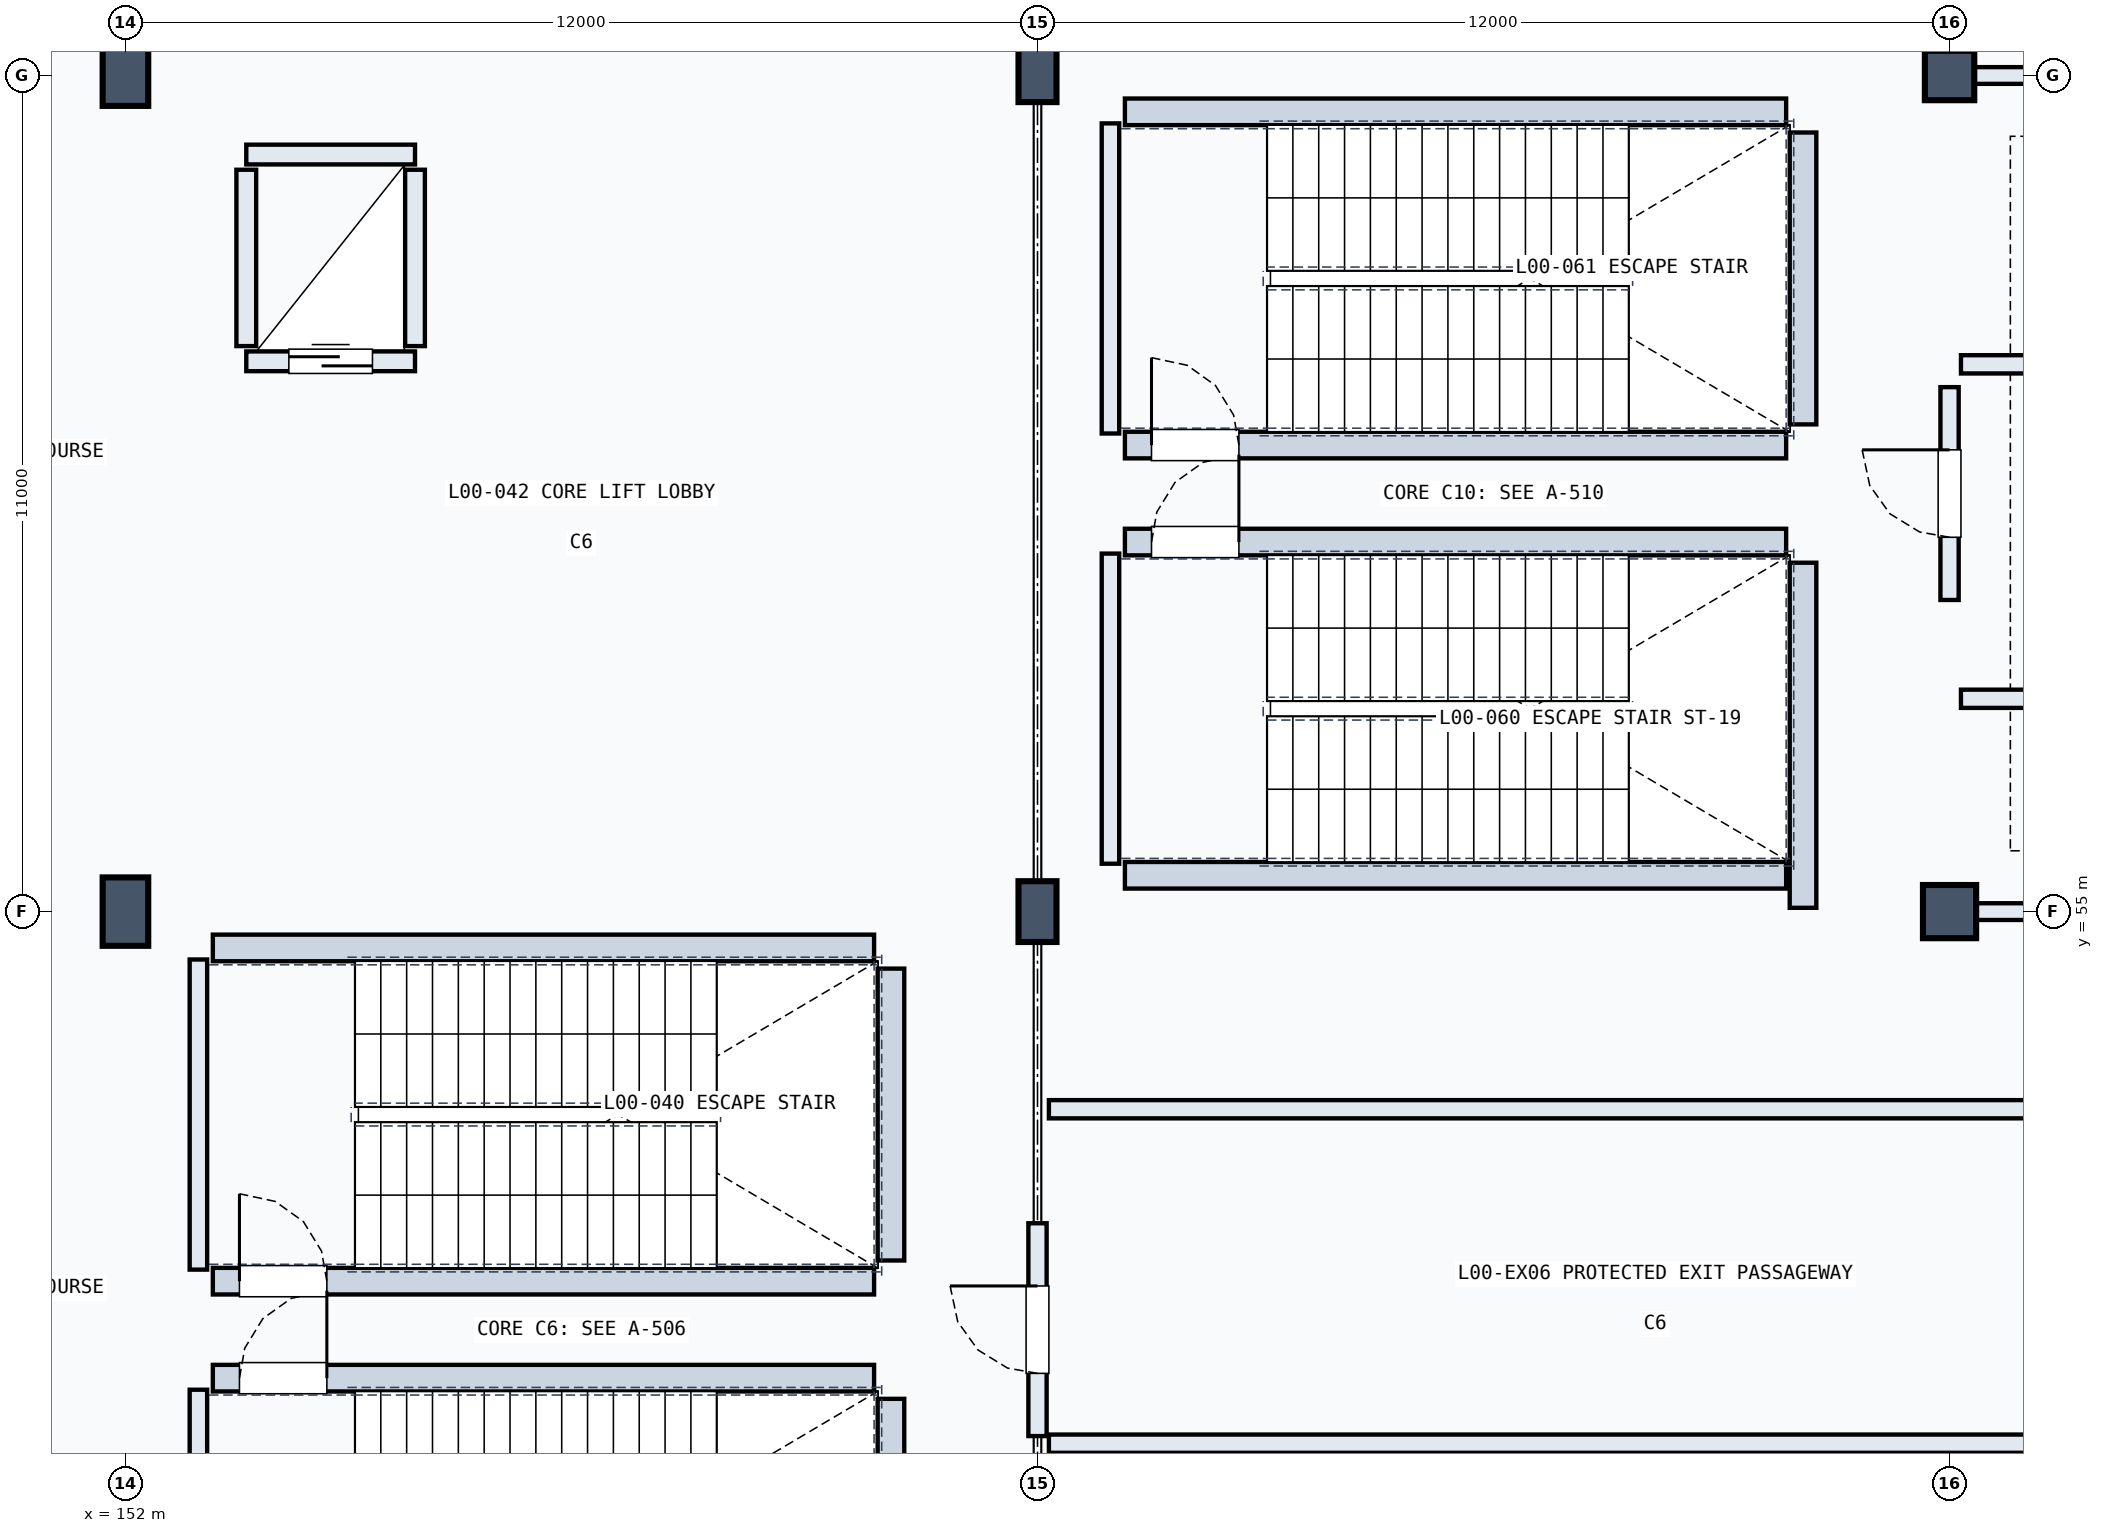
"""IFC4 building model, lengths in metres.
Left out: names, types, materials, properties, quantities, classifications, styles, units other than length and angle.
Written with IfcOpenShell. Run it as: python <this file> out.ifc"""

import sys

from ifc_helpers import new_model, si_unit, direction, frame, frame_2d, origin, origin_2d, place, context, subcontext, project, spatial, rectangle, extrude, element, fill, save


model = new_model("IFC4")
c1 = context("Model", 3, precision=1e-05, world=origin(), true_north=direction((0.0, 1.0)))
c2 = subcontext(c1, "Body", "Model", "MODEL_VIEW")
j1 = project(units=[si_unit("LENGTHUNIT", "METRE"), si_unit("PLANEANGLEUNIT", "RADIAN")], contexts=[c1])
p1 = place(None, origin())
s1 = spatial("IfcSite", under=j1, at=p1, CompositionType="ELEMENT")
p2 = place(p1, origin())
s2 = spatial("IfcBuilding", under=s1, at=p2, CompositionType="ELEMENT")
p3 = place(p2, origin())
s3 = spatial("IfcBuildingStorey", under=s2, at=p3, CompositionType="ELEMENT", Elevation=0.0)
p4 = place(p3, frame((152.0, 55.0, 0.0), z_axis=(0.0, 0.0, 1.0), x_axis=(1.0, 0.0, 0.0)))
e1 = element("IfcColumn", 1, at=p4, inside=s3, PredefinedType="COLUMN", context=c2, shape_type="SweptSolid", body=[
    extrude(rectangle(XDim=0.6, YDim=0.9, at=origin_2d()), origin(), (0.0, 0.0, 1.0), 5.4),
])
p5 = place(p3, frame((152.0, 66.0, 0.0), z_axis=(0.0, 0.0, 1.0), x_axis=(1.0, 0.0, 0.0)))
e2 = element("IfcColumn", 2, at=p5, inside=s3, PredefinedType="COLUMN", context=c2, shape_type="SweptSolid", body=[
    extrude(rectangle(XDim=0.6, YDim=0.8, at=origin_2d()), origin(), (0.0, 0.0, 1.0), 5.4),
])
p6 = place(p3, frame((164.0, 55.0, 0.0), z_axis=(0.0, 0.0, 1.0), x_axis=(1.0, 0.0, 0.0)))
e3 = element("IfcColumn", 3, at=p6, inside=s3, PredefinedType="COLUMN", context=c2, shape_type="SweptSolid", body=[
    extrude(rectangle(XDim=0.5, YDim=0.8, at=origin_2d()), origin(), (0.0, 0.0, 1.0), 5.4),
])
p7 = place(p3, frame((164.0, 66.0, 0.0), z_axis=(0.0, 0.0, 1.0), x_axis=(1.0, 0.0, 0.0)))
e4 = element("IfcColumn", 4, at=p7, inside=s3, PredefinedType="COLUMN", context=c2, shape_type="SweptSolid", body=[
    extrude(rectangle(XDim=0.5, YDim=0.7, at=origin_2d()), origin(), (0.0, 0.0, 1.0), 5.4),
])
p8 = place(p3, frame((176.0, 55.0, 0.0), z_axis=(0.0, 0.0, 1.0), x_axis=(1.0, 0.0, 0.0)))
e5 = element("IfcColumn", 5, at=p8, inside=s3, PredefinedType="COLUMN", context=c2, shape_type="SweptSolid", body=[
    extrude(rectangle(XDim=0.7, YDim=0.7, at=origin_2d()), origin(), (0.0, 0.0, 1.0), 5.4),
])
p9 = place(p3, frame((176.0, 66.0, 0.0), z_axis=(0.0, 0.0, 1.0), x_axis=(1.0, 0.0, 0.0)))
e6 = element("IfcColumn", 6, at=p9, inside=s3, PredefinedType="COLUMN", context=c2, shape_type="SweptSolid", body=[
    extrude(rectangle(XDim=0.65, YDim=0.65, at=origin_2d()), origin(), (0.0, 0.0, 1.0), 5.4),
])
p10 = place(p3, frame((152.96, 44.63, 0.0), z_axis=(0.0, 0.0, 1.0), x_axis=(0.0, 1.0, 0.0)))
e7 = element("IfcWall", 7, at=p10, inside=s3, PredefinedType="SOLIDWALL", context=c2, shape_type="SweptSolid", body=[
    extrude(rectangle(XDim=4.08, YDim=0.23, at=frame_2d((2.04, 0.0))), origin(), (0.0, 0.0, 1.0), 5.06),
])
p11 = place(p3, frame((162.072, 44.05, 0.0), z_axis=(0.0, 0.0, 1.0), x_axis=(0.0, 1.0, 0.0)))
e8 = element("IfcWall", 8, at=p11, inside=s3, PredefinedType="SOLIDWALL", context=c2, shape_type="SweptSolid", body=[
    extrude(rectangle(XDim=4.54, YDim=0.35, at=frame_2d((2.27, 0.0))), origin(), (0.0, 0.0, 1.0), 5.06),
])
p12 = place(p3, frame((153.15, 48.862, 0.0), z_axis=(0.0, 0.0, 1.0), x_axis=(1.0, 0.0, 0.0)))
e9 = element("IfcWall", 9, at=p12, inside=s3, PredefinedType="SOLIDWALL", context=c2, shape_type="SweptSolid", body=[
    extrude(rectangle(XDim=8.7, YDim=0.35, at=frame_2d((4.35, 0.0))), origin(), (0.0, 0.0, 1.0), 5.06),
])
p13 = place(p12, frame((0.35, 0.0, 0.0)))
e10 = element("IfcOpeningElement", 10, at=p13, cuts=e9, PredefinedType="OPENING", context=c2, shape_type="SweptSolid", body=[
    extrude(rectangle(XDim=1.15, YDim=2.2, at=frame_2d((0.575, 1.1))), frame((0.0, 0.185, 0.0), z_axis=(0.0, -1.0, 0.0), x_axis=(1.0, 0.0, 0.0)), (0.0, 0.0, 1.0), 0.37),
])
p14 = place(p3, frame((152.96, 50.29, 0.0), z_axis=(0.0, 0.0, 1.0), x_axis=(0.0, 1.0, 0.0)))
e11 = element("IfcWall", 11, at=p14, inside=s3, PredefinedType="SOLIDWALL", context=c2, shape_type="SweptSolid", body=[
    extrude(rectangle(XDim=4.08, YDim=0.23, at=frame_2d((2.04, 0.0))), origin(), (0.0, 0.0, 1.0), 5.06),
])
p15 = place(p3, frame((162.072, 50.41, 0.0), z_axis=(0.0, 0.0, 1.0), x_axis=(0.0, 1.0, 0.0)))
e12 = element("IfcWall", 12, at=p15, inside=s3, PredefinedType="SOLIDWALL", context=c2, shape_type="SweptSolid", body=[
    extrude(rectangle(XDim=3.84, YDim=0.35, at=frame_2d((1.92, 0.0))), origin(), (0.0, 0.0, 1.0), 5.06),
])
p16 = place(p3, frame((153.15, 50.138, 0.0), z_axis=(0.0, 0.0, 1.0), x_axis=(1.0, 0.0, 0.0)))
e13 = element("IfcWall", 13, at=p16, inside=s3, PredefinedType="SOLIDWALL", context=c2, shape_type="SweptSolid", body=[
    extrude(rectangle(XDim=8.7, YDim=0.35, at=frame_2d((4.35, 0.0))), origin(), (0.0, 0.0, 1.0), 5.06),
])
p17 = place(p16, frame((0.35, 0.0, 0.0)))
e14 = element("IfcOpeningElement", 14, at=p17, cuts=e13, PredefinedType="OPENING", context=c2, shape_type="SweptSolid", body=[
    extrude(rectangle(XDim=1.15, YDim=2.2, at=frame_2d((0.575, 1.1))), frame((0.0, 0.185, 0.0), z_axis=(0.0, -1.0, 0.0), x_axis=(1.0, 0.0, 0.0)), (0.0, 0.0, 1.0), 0.37),
])
p18 = place(p3, frame((153.15, 54.522, 0.0), z_axis=(0.0, 0.0, 1.0), x_axis=(1.0, 0.0, 0.0)))
e15 = element("IfcWall", 15, at=p18, inside=s3, PredefinedType="SOLIDWALL", context=c2, shape_type="SweptSolid", body=[
    extrude(rectangle(XDim=8.7, YDim=0.35, at=frame_2d((4.35, 0.0))), origin(), (0.0, 0.0, 1.0), 5.06),
])
p19 = place(p3, frame((153.59, 62.24, 0.0), z_axis=(0.0, 0.0, 1.0), x_axis=(1.0, 0.0, 0.0)))
e16 = element("IfcWall", 16, at=p19, inside=s3, PredefinedType="SOLIDWALL", context=c2, shape_type="SweptSolid", body=[
    extrude(rectangle(XDim=2.22, YDim=0.26, at=frame_2d((1.11, 0.0))), origin(), (0.0, 0.0, 1.0), 5.06),
])
p20 = place(p19, frame((0.56, 0.0, 0.0)))
e17 = element("IfcOpeningElement", 17, at=p20, cuts=e16, PredefinedType="OPENING", context=c2, shape_type="SweptSolid", body=[
    extrude(rectangle(XDim=1.1, YDim=2.15, at=frame_2d((0.55, 1.075))), frame((0.0, 0.14, 0.0), z_axis=(0.0, -1.0, 0.0), x_axis=(1.0, 0.0, 0.0)), (0.0, 0.0, 1.0), 0.28),
])
p21 = place(p3, frame((153.59, 64.96, 0.0), z_axis=(0.0, 0.0, 1.0), x_axis=(1.0, 0.0, 0.0)))
e18 = element("IfcWall", 18, at=p21, inside=s3, PredefinedType="SOLIDWALL", context=c2, shape_type="SweptSolid", body=[
    extrude(rectangle(XDim=2.22, YDim=0.26, at=frame_2d((1.11, 0.0))), origin(), (0.0, 0.0, 1.0), 5.06),
])
for number, where, z_axis, x_axis in (
    (19, (153.59, 62.44, 0.0), (0.0, 0.0, 1.0), (0.0, 1.0, 0.0)),
    (20, (155.81, 62.44, 0.0), (0.0, 0.0, 1.0), (0.0, 1.0, 0.0)),
):
    element("IfcWall", number, at=place(p3, frame(where, z_axis=z_axis, x_axis=x_axis)), inside=s3, PredefinedType="SOLIDWALL", context=c2, shape_type="SweptSolid", body=[
        extrude(rectangle(XDim=2.32, YDim=0.26, at=frame_2d((1.16, 0.0))), origin(), (0.0, 0.0, 1.0), 5.06),
    ])
p22 = place(p3, frame((164.96, 55.63, 0.0), z_axis=(0.0, 0.0, 1.0), x_axis=(0.0, 1.0, 0.0)))
e21 = element("IfcWall", 21, at=p22, inside=s3, PredefinedType="SOLIDWALL", context=c2, shape_type="SweptSolid", body=[
    extrude(rectangle(XDim=4.08, YDim=0.23, at=frame_2d((2.04, 0.0))), origin(), (0.0, 0.0, 1.0), 4.45),
])
p23 = place(p3, frame((174.072, 55.05, 0.0), z_axis=(0.0, 0.0, 1.0), x_axis=(0.0, 1.0, 0.0)))
e22 = element("IfcWall", 22, at=p23, inside=s3, PredefinedType="SOLIDWALL", context=c2, shape_type="SweptSolid", body=[
    extrude(rectangle(XDim=4.54, YDim=0.35, at=frame_2d((2.27, 0.0))), origin(), (0.0, 0.0, 1.0), 5.06),
])
p24 = place(p3, frame((165.15, 55.478, 0.0), z_axis=(0.0, 0.0, 1.0), x_axis=(1.0, 0.0, 0.0)))
e23 = element("IfcWall", 23, at=p24, inside=s3, PredefinedType="SOLIDWALL", context=c2, shape_type="SweptSolid", body=[
    extrude(rectangle(XDim=8.7, YDim=0.35, at=frame_2d((4.35, 0.0))), origin(), (0.0, 0.0, 1.0), 5.06),
])
p25 = place(p3, frame((165.15, 59.862, 0.0), z_axis=(0.0, 0.0, 1.0), x_axis=(1.0, 0.0, 0.0)))
e24 = element("IfcWall", 24, at=p25, inside=s3, PredefinedType="SOLIDWALL", context=c2, shape_type="SweptSolid", body=[
    extrude(rectangle(XDim=8.7, YDim=0.35, at=frame_2d((4.35, 0.0))), origin(), (0.0, 0.0, 1.0), 5.06),
])
p26 = place(p25, frame((0.35, 0.0, 0.0)))
e25 = element("IfcOpeningElement", 25, at=p26, cuts=e24, PredefinedType="OPENING", context=c2, shape_type="SweptSolid", body=[
    extrude(rectangle(XDim=1.15, YDim=2.2, at=frame_2d((0.575, 1.1))), frame((0.0, 0.185, 0.0), z_axis=(0.0, -1.0, 0.0), x_axis=(1.0, 0.0, 0.0)), (0.0, 0.0, 1.0), 0.37),
])
p27 = place(p3, frame((164.96, 61.29, 0.0), z_axis=(0.0, 0.0, 1.0), x_axis=(0.0, 1.0, 0.0)))
e26 = element("IfcWall", 26, at=p27, inside=s3, PredefinedType="SOLIDWALL", context=c2, shape_type="SweptSolid", body=[
    extrude(rectangle(XDim=4.08, YDim=0.23, at=frame_2d((2.04, 0.0))), origin(), (0.0, 0.0, 1.0), 4.45),
])
p28 = place(p3, frame((174.072, 61.41, 0.0), z_axis=(0.0, 0.0, 1.0), x_axis=(0.0, 1.0, 0.0)))
e27 = element("IfcWall", 27, at=p28, inside=s3, PredefinedType="SOLIDWALL", context=c2, shape_type="SweptSolid", body=[
    extrude(rectangle(XDim=3.84, YDim=0.35, at=frame_2d((1.92, 0.0))), origin(), (0.0, 0.0, 1.0), 5.06),
])
p29 = place(p3, frame((165.15, 61.138, 0.0), z_axis=(0.0, 0.0, 1.0), x_axis=(1.0, 0.0, 0.0)))
e28 = element("IfcWall", 28, at=p29, inside=s3, PredefinedType="SOLIDWALL", context=c2, shape_type="SweptSolid", body=[
    extrude(rectangle(XDim=8.7, YDim=0.35, at=frame_2d((4.35, 0.0))), origin(), (0.0, 0.0, 1.0), 5.06),
])
p30 = place(p29, frame((0.35, 0.0, 0.0)))
e29 = element("IfcOpeningElement", 29, at=p30, cuts=e28, PredefinedType="OPENING", context=c2, shape_type="SweptSolid", body=[
    extrude(rectangle(XDim=1.15, YDim=2.2, at=frame_2d((0.575, 1.1))), frame((0.0, 0.185, 0.0), z_axis=(0.0, -1.0, 0.0), x_axis=(1.0, 0.0, 0.0)), (0.0, 0.0, 1.0), 0.37),
])
p31 = place(p3, frame((165.15, 65.522, 0.0), z_axis=(0.0, 0.0, 1.0), x_axis=(1.0, 0.0, 0.0)))
e30 = element("IfcWall", 30, at=p31, inside=s3, PredefinedType="SOLIDWALL", context=c2, shape_type="SweptSolid", body=[
    extrude(rectangle(XDim=8.7, YDim=0.35, at=frame_2d((4.35, 0.0))), origin(), (0.0, 0.0, 1.0), 5.06),
])
p32 = place(p3, frame((176.22, 55.0, 0.0), z_axis=(0.0, 0.0, 1.0), x_axis=(1.0, 0.0, 0.0)))
e31 = element("IfcWall", 31, at=p32, inside=s3, PredefinedType="PARTITIONING", context=c2, shape_type="SweptSolid", body=[
    extrude(rectangle(XDim=10.56, YDim=0.22, at=frame_2d((5.28, 0.0))), origin(), (0.0, 0.0, 1.0), 4.1),
])
p33 = place(p32, frame((4.77, 0.0, 0.0)))
e32 = element("IfcOpeningElement", 32, at=p33, cuts=e31, PredefinedType="OPENING", context=c2, shape_type="SweptSolid", body=[
    extrude(rectangle(XDim=1.02, YDim=2.25, at=frame_2d((0.51, 1.125))), frame((0.0, 0.12, 0.0), z_axis=(0.0, -1.0, 0.0), x_axis=(1.0, 0.0, 0.0)), (0.0, 0.0, 1.0), 0.24),
])
p34 = place(p3, frame((176.22, 66.0, 0.0), z_axis=(0.0, 0.0, 1.0), x_axis=(1.0, 0.0, 0.0)))
e33 = element("IfcWall", 33, at=p34, inside=s3, PredefinedType="PARTITIONING", context=c2, shape_type="SweptSolid", body=[
    extrude(rectangle(XDim=10.56, YDim=0.22, at=frame_2d((5.28, 0.0))), origin(), (0.0, 0.0, 1.0), 4.3),
])
p35 = place(p3, frame((176.15, 57.8, 0.0), z_axis=(0.0, 0.0, 1.0), x_axis=(1.0, 0.0, 0.0)))
e34 = element("IfcWall", 34, at=p35, inside=s3, PredefinedType="PARTITIONING", context=c2, shape_type="SweptSolid", body=[
    extrude(rectangle(XDim=21.65, YDim=0.24, at=frame_2d((10.825, 0.0))), origin(), (0.0, 0.0, 1.0), 4.3),
])
p36 = place(p3, frame((176.15, 62.2, 0.0), z_axis=(0.0, 0.0, 1.0), x_axis=(1.0, 0.0, 0.0)))
e35 = element("IfcWall", 35, at=p36, inside=s3, PredefinedType="PARTITIONING", context=c2, shape_type="SweptSolid", body=[
    extrude(rectangle(XDim=21.65, YDim=0.24, at=frame_2d((10.825, 0.0))), origin(), (0.0, 0.0, 1.0), 4.3),
])
p37 = place(p36, frame((6.577, 0.0, 0.0)))
e36 = element("IfcOpeningElement", 36, at=p37, cuts=e35, PredefinedType="OPENING", context=c2, shape_type="SweptSolid", body=[
    extrude(rectangle(XDim=2.0, YDim=2.25, at=frame_2d((1.0, 1.125))), frame((0.0, 0.13, 0.0), z_axis=(0.0, -1.0, 0.0), x_axis=(1.0, 0.0, 0.0)), (0.0, 0.0, 1.0), 0.26),
])
p38 = place(p3, frame((164.15, 48.0, 0.0), z_axis=(0.0, 0.0, 1.0), x_axis=(1.0, 0.0, 0.0)))
e37 = element("IfcWall", 37, at=p38, inside=s3, PredefinedType="PARTITIONING", context=c2, shape_type="SweptSolid", body=[
    extrude(rectangle(XDim=33.65, YDim=0.24, at=frame_2d((16.825, 0.0))), origin(), (0.0, 0.0, 1.0), 4.25),
])
p39 = place(p3, frame((164.15, 52.4, 0.0), z_axis=(0.0, 0.0, 1.0), x_axis=(1.0, 0.0, 0.0)))
e38 = element("IfcWall", 38, at=p39, inside=s3, PredefinedType="PARTITIONING", context=c2, shape_type="SweptSolid", body=[
    extrude(rectangle(XDim=33.65, YDim=0.24, at=frame_2d((16.825, 0.0))), origin(), (0.0, 0.0, 1.0), 4.25),
])
p40 = place(p39, frame((15.825, 0.0, 0.0)))
e39 = element("IfcOpeningElement", 39, at=p40, cuts=e38, PredefinedType="OPENING", context=c2, shape_type="SweptSolid", body=[
    extrude(rectangle(XDim=2.0, YDim=2.25, at=frame_2d((1.0, 1.125))), frame((0.0, 0.13, 0.0), z_axis=(0.0, -1.0, 0.0), x_axis=(1.0, 0.0, 0.0)), (0.0, 0.0, 1.0), 0.26),
])
p41 = place(p3, frame((164.0, 48.1, 0.0), z_axis=(0.0, 0.0, 1.0), x_axis=(0.0, 1.0, 0.0)))
e40 = element("IfcWall", 40, at=p41, inside=s3, PredefinedType="PARTITIONING", context=c2, shape_type="SweptSolid", body=[
    extrude(rectangle(XDim=2.8, YDim=0.24, at=frame_2d((1.4, 0.0))), origin(), (0.0, 0.0, 1.0), 4.65),
])
p42 = place(p41, frame((0.825, 0.0, 0.0)))
e41 = element("IfcOpeningElement", 41, at=p42, cuts=e40, PredefinedType="OPENING", context=c2, shape_type="SweptSolid", body=[
    extrude(rectangle(XDim=1.15, YDim=2.2, at=frame_2d((0.575, 1.1))), frame((0.0, 0.13, 0.0), z_axis=(0.0, -1.0, 0.0), x_axis=(1.0, 0.0, 0.0)), (0.0, 0.0, 1.0), 0.26),
])
p43 = place(p3, frame((176.0, 59.1, 0.0), z_axis=(0.0, 0.0, 1.0), x_axis=(0.0, 1.0, 0.0)))
e42 = element("IfcWall", 42, at=p43, inside=s3, PredefinedType="PARTITIONING", context=c2, shape_type="SweptSolid", body=[
    extrude(rectangle(XDim=2.8, YDim=0.24, at=frame_2d((1.4, 0.0))), origin(), (0.0, 0.0, 1.0), 4.3),
])
p44 = place(p43, frame((0.825, 0.0, 0.0)))
e43 = element("IfcOpeningElement", 43, at=p44, cuts=e42, PredefinedType="OPENING", context=c2, shape_type="SweptSolid", body=[
    extrude(rectangle(XDim=1.15, YDim=2.2, at=frame_2d((0.575, 1.1))), frame((0.0, 0.13, 0.0), z_axis=(0.0, -1.0, 0.0), x_axis=(1.0, 0.0, 0.0)), (0.0, 0.0, 1.0), 0.26),
])
p45 = place(p13, origin())
e44 = element("IfcDoor", 44, at=p45, inside=s3, OperationType="SINGLE_SWING_RIGHT", PredefinedType="DOOR", context=c2, shape_type="SweptSolid", body=[
    extrude(rectangle(XDim=1.15, YDim=2.2, at=frame_2d((0.575, 1.1))), frame((0.0, 0.025, 0.0), z_axis=(0.0, -1.0, 0.0), x_axis=(1.0, 0.0, 0.0)), (0.0, 0.0, 1.0), 0.05),
])
fill(e10, e44)
p46 = place(p17, origin())
e45 = element("IfcDoor", 45, at=p46, inside=s3, OperationType="SINGLE_SWING_LEFT", PredefinedType="DOOR", context=c2, shape_type="SweptSolid", body=[
    extrude(rectangle(XDim=1.15, YDim=2.2, at=frame_2d((0.575, 1.1))), frame((0.0, 0.025, 0.0), z_axis=(0.0, -1.0, 0.0), x_axis=(1.0, 0.0, 0.0)), (0.0, 0.0, 1.0), 0.05),
])
fill(e14, e45)
p47 = place(p20, origin())
e46 = element("IfcDoor", 46, at=p47, inside=s3, OperationType="SLIDING_TO_LEFT", PredefinedType="DOOR", context=c2, shape_type="SweptSolid", body=[
    extrude(rectangle(XDim=1.1, YDim=2.15, at=frame_2d((0.55, 1.075))), frame((0.0, 0.025, 0.0), z_axis=(0.0, -1.0, 0.0), x_axis=(1.0, 0.0, 0.0)), (0.0, 0.0, 1.0), 0.05),
])
fill(e17, e46)
p48 = place(p26, origin())
e47 = element("IfcDoor", 47, at=p48, inside=s3, OperationType="SINGLE_SWING_RIGHT", PredefinedType="DOOR", context=c2, shape_type="SweptSolid", body=[
    extrude(rectangle(XDim=1.15, YDim=2.2, at=frame_2d((0.575, 1.1))), frame((0.0, 0.025, 0.0), z_axis=(0.0, -1.0, 0.0), x_axis=(1.0, 0.0, 0.0)), (0.0, 0.0, 1.0), 0.05),
])
fill(e25, e47)
p49 = place(p30, origin())
e48 = element("IfcDoor", 48, at=p49, inside=s3, OperationType="SINGLE_SWING_LEFT", PredefinedType="DOOR", context=c2, shape_type="SweptSolid", body=[
    extrude(rectangle(XDim=1.15, YDim=2.2, at=frame_2d((0.575, 1.1))), frame((0.0, 0.025, 0.0), z_axis=(0.0, -1.0, 0.0), x_axis=(1.0, 0.0, 0.0)), (0.0, 0.0, 1.0), 0.05),
])
fill(e29, e48)
p50 = place(p42, origin())
e49 = element("IfcDoor", 49, at=p50, inside=s3, OperationType="SINGLE_SWING_RIGHT", PredefinedType="DOOR", context=c2, shape_type="SweptSolid", body=[
    extrude(rectangle(XDim=1.15, YDim=2.2, at=frame_2d((0.575, 1.1))), frame((0.0, 0.025, 0.0), z_axis=(0.0, -1.0, 0.0), x_axis=(1.0, 0.0, 0.0)), (0.0, 0.0, 1.0), 0.05),
])
fill(e41, e49)
p51 = place(p44, origin())
e50 = element("IfcDoor", 50, at=p51, inside=s3, OperationType="SINGLE_SWING_RIGHT", PredefinedType="DOOR", context=c2, shape_type="SweptSolid", body=[
    extrude(rectangle(XDim=1.15, YDim=2.2, at=frame_2d((0.575, 1.1))), frame((0.0, 0.025, 0.0), z_axis=(0.0, -1.0, 0.0), x_axis=(1.0, 0.0, 0.0)), (0.0, 0.0, 1.0), 0.05),
])
fill(e43, e50)
save(model, sys.argv[1])
